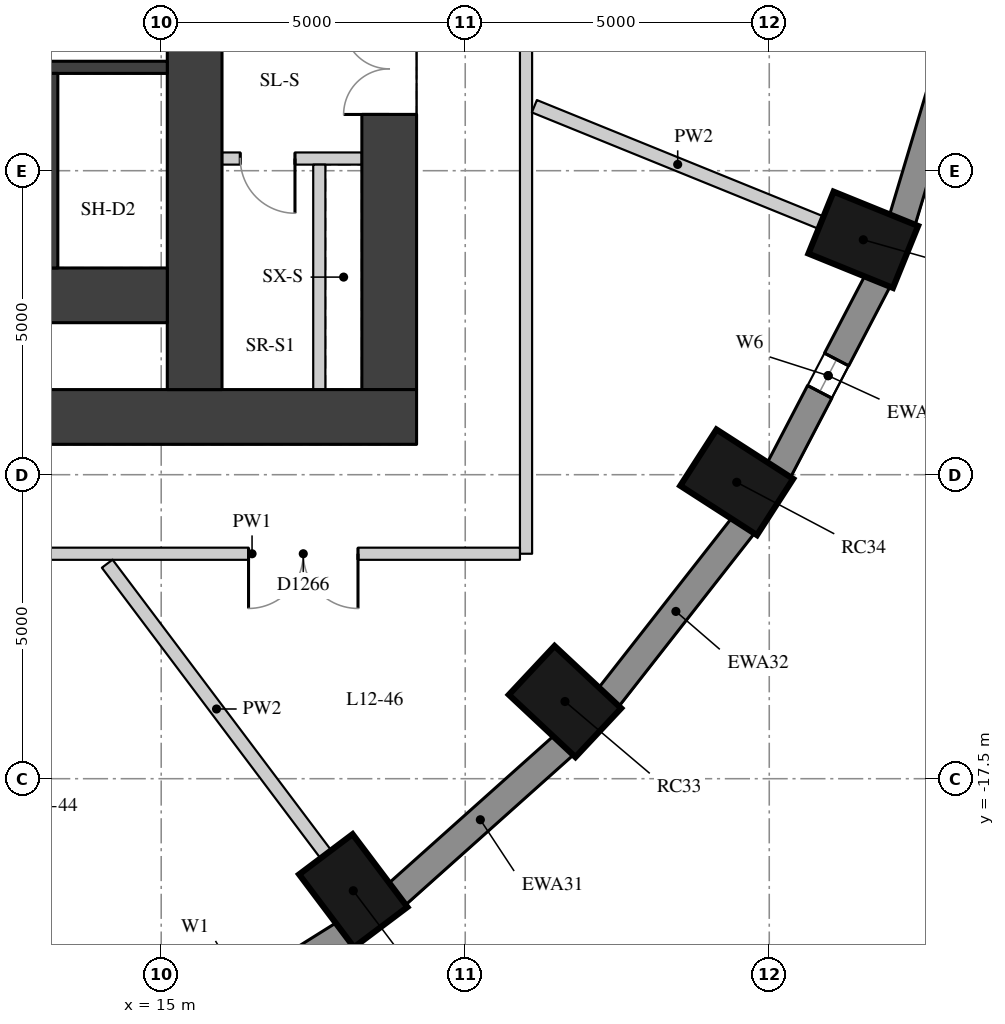
"""IFC4 building model, lengths in metres.
Left out: names, types, materials, properties, quantities, classifications, styles, units other than length and angle.
Written with IfcOpenShell. Run it as: python <this file> out.ifc"""

import sys

from ifc_helpers import new_model, si_unit, direction, frame, frame_2d, origin, origin_2d, place, context, subcontext, project, spatial, rectangle, extrude, element, fill, save


model = new_model("IFC4")
c1 = context("Model", 3, precision=1e-05, world=origin(), true_north=direction((0.0, 1.0)))
c2 = subcontext(c1, "Body", "Model", "MODEL_VIEW")
j1 = project(units=[si_unit("LENGTHUNIT", "METRE"), si_unit("PLANEANGLEUNIT", "RADIAN")], contexts=[c1])
p1 = place(None, origin())
s1 = spatial("IfcSite", under=j1, at=p1, CompositionType="ELEMENT")
p2 = place(p1, origin())
s2 = spatial("IfcBuilding", under=s1, at=p2, CompositionType="ELEMENT")
p3 = place(p2, frame((0.0, 0.0, 48.1)))
s3 = spatial("IfcBuildingStorey", under=s2, at=p3, CompositionType="ELEMENT", Elevation=48.1)
for number, where, z_axis, x_axis in (
    (1, (18.159, -19.343, 0.0), (0.0, 0.0, 1.0), (0.601, -0.799, 0.0)),
    (2, (21.641, -16.23, 0.0), (0.0, 0.0, 1.0), (0.73, -0.683, 0.0)),
    (3, (24.465, -12.625, 0.0), (0.0, 0.0, 1.0), (0.841, -0.541, 0.0)),
    (4, (26.546, -8.636, 0.0), (0.0, 0.0, 1.0), (0.927, -0.376, 0.0)),
):
    element("IfcColumn", number, at=place(p3, frame(where, z_axis=z_axis, x_axis=x_axis)), inside=s3, PredefinedType="COLUMN", context=c2, shape_type="SweptSolid", body=[
        extrude(rectangle(XDim=1.5, YDim=1.1, at=origin_2d()), origin(), (0.0, 0.0, 1.0), 3.3),
    ])
p4 = place(p3, frame((14.817, -22.051, 0.0), z_axis=(0.0, 0.0, 1.0), x_axis=(0.847635480093, 0.530579016629, 0.0)))
e5 = element("IfcWall", 5, at=p4, inside=s3, PredefinedType="SOLIDWALL", context=c2, shape_type="SweptSolid", body=[
    extrude(rectangle(XDim=3.782, YDim=0.45, at=frame_2d((1.891, 0.0))), origin(), (0.0, 0.0, 1.0), 3.02),
])
p5 = place(p4, frame((0.791, 0.0, 0.4)))
e6 = element("IfcOpeningElement", 6, at=p5, cuts=e5, PredefinedType="OPENING", context=c2, shape_type="SweptSolid", body=[
    extrude(rectangle(XDim=2.2, YDim=1.75, at=frame_2d((1.1, 0.875))), frame((0.0, 0.235, 0.0), z_axis=(0.0, -1.0, 0.0), x_axis=(1.0, 0.0, 0.0)), (0.0, 0.0, 1.0), 0.47),
])
p6 = place(p3, frame((18.871, -19.407, 0.0), z_axis=(0.0, 0.0, 1.0), x_axis=(0.745526233716, 0.66647628228, 0.0)))
e7 = element("IfcWall", 7, at=p6, inside=s3, PredefinedType="SOLIDWALL", context=c2, shape_type="SweptSolid", body=[
    extrude(rectangle(XDim=3.697, YDim=0.45, at=frame_2d((1.848, 0.0))), origin(), (0.0, 0.0, 1.0), 3.02),
])
p7 = place(p3, frame((22.352, -16.17, 0.0), z_axis=(0.0, 0.0, 1.0), x_axis=(0.616661975264, 0.787228053529, 0.0)))
e8 = element("IfcWall", 8, at=p7, inside=s3, PredefinedType="SOLIDWALL", context=c2, shape_type="SweptSolid", body=[
    extrude(rectangle(XDim=3.61, YDim=0.45, at=frame_2d((1.805, 0.0))), origin(), (0.0, 0.0, 1.0), 3.02),
])
p8 = place(p3, frame((25.152, -12.437, 0.0), z_axis=(0.0, 0.0, 1.0), x_axis=(0.462492775226, 0.886623050041, 0.0)))
e9 = element("IfcWall", 9, at=p8, inside=s3, PredefinedType="SOLIDWALL", context=c2, shape_type="SweptSolid", body=[
    extrude(rectangle(XDim=3.532, YDim=0.45, at=frame_2d((1.766, 0.0))), origin(), (0.0, 0.0, 1.0), 3.02),
])
p9 = place(p8, frame((1.466, 0.0, 0.4)))
e10 = element("IfcOpeningElement", 10, at=p9, cuts=e9, PredefinedType="OPENING", context=c2, shape_type="SweptSolid", body=[
    extrude(rectangle(XDim=0.6, YDim=1.75, at=frame_2d((0.3, 0.875))), frame((0.0, 0.235, 0.0), z_axis=(0.0, -1.0, 0.0), x_axis=(1.0, 0.0, 0.0)), (0.0, 0.0, 1.0), 0.47),
])
p10 = place(p3, frame((27.185, -8.323, 0.0), z_axis=(0.0, 0.0, 1.0), x_axis=(0.287064133733, 0.957911364963, 0.0)))
e11 = element("IfcWall", 11, at=p10, inside=s3, PredefinedType="SOLIDWALL", context=c2, shape_type="SweptSolid", body=[
    extrude(rectangle(XDim=3.473, YDim=0.45, at=frame_2d((1.737, 0.0))), origin(), (0.0, 0.0, 1.0), 3.02),
])
p11 = place(p3, frame((18.75, -11.1, 0.0), z_axis=(0.0, 0.0, 1.0), x_axis=(0.0, 1.0, 0.0)))
e12 = element("IfcWall", 12, at=p11, inside=s3, PredefinedType="SHEAR", context=c2, shape_type="SweptSolid", body=[
    extrude(rectangle(XDim=22.2, YDim=0.9, at=frame_2d((11.1, 0.0))), origin(), (0.0, 0.0, 1.0), 3.02),
])
p12 = place(p11, frame((15.925, 0.0, 0.0)))
e13 = element("IfcOpeningElement", 13, at=p12, cuts=e12, PredefinedType="OPENING", context=c2, shape_type="SweptSolid", body=[
    extrude(rectangle(XDim=1.5, YDim=2.1, at=frame_2d((0.75, 1.05))), frame((0.0, 0.46, 0.0), z_axis=(0.0, -1.0, 0.0), x_axis=(1.0, 0.0, 0.0)), (0.0, 0.0, 1.0), 0.92),
])
p13 = place(p11, frame((4.525, 0.0, 0.0)))
e14 = element("IfcOpeningElement", 14, at=p13, cuts=e12, PredefinedType="OPENING", context=c2, shape_type="SweptSolid", body=[
    extrude(rectangle(XDim=1.5, YDim=2.1, at=frame_2d((0.75, 1.05))), frame((0.0, 0.46, 0.0), z_axis=(0.0, -1.0, 0.0), x_axis=(1.0, 0.0, 0.0)), (0.0, 0.0, 1.0), 0.92),
])
p14 = place(p3, frame((4.0, -11.55, 0.0), z_axis=(0.0, 0.0, 1.0), x_axis=(1.0, 0.0, 0.0)))
e15 = element("IfcWall", 15, at=p14, inside=s3, PredefinedType="SHEAR", context=c2, shape_type="SweptSolid", body=[
    extrude(rectangle(XDim=15.2, YDim=0.9, at=frame_2d((7.6, 0.0))), origin(), (0.0, 0.0, 1.0), 3.02),
])
p15 = place(p3, frame((15.55, -11.1, 0.0), z_axis=(0.0, 0.0, 1.0), x_axis=(0.0, 1.0, 0.0)))
e16 = element("IfcWall", 16, at=p15, inside=s3, PredefinedType="SHEAR", context=c2, shape_type="SweptSolid", body=[
    extrude(rectangle(XDim=22.2, YDim=0.9, at=frame_2d((11.1, 0.0))), origin(), (0.0, 0.0, 1.0), 3.02),
])
p16 = place(p15, frame((15.6, 0.0, 0.0)))
e17 = element("IfcOpeningElement", 17, at=p16, cuts=e16, PredefinedType="OPENING", context=c2, shape_type="SweptSolid", body=[
    extrude(rectangle(XDim=1.0, YDim=2.1, at=frame_2d((0.5, 1.05))), frame((0.0, 0.46, 0.0), z_axis=(0.0, -1.0, 0.0), x_axis=(1.0, 0.0, 0.0)), (0.0, 0.0, 1.0), 0.92),
])
p17 = place(p15, frame((5.6, 0.0, 0.0)))
e18 = element("IfcOpeningElement", 18, at=p17, cuts=e16, PredefinedType="OPENING", context=c2, shape_type="SweptSolid", body=[
    extrude(rectangle(XDim=1.0, YDim=2.1, at=frame_2d((0.5, 1.05))), frame((0.0, 0.46, 0.0), z_axis=(0.0, -1.0, 0.0), x_axis=(1.0, 0.0, 0.0)), (0.0, 0.0, 1.0), 0.92),
])
p18 = place(p3, frame((4.9, -9.55, 0.0), z_axis=(0.0, 0.0, 1.0), x_axis=(1.0, 0.0, 0.0)))
e19 = element("IfcWall", 19, at=p18, inside=s3, PredefinedType="SHEAR", context=c2, shape_type="SweptSolid", body=[
    extrude(rectangle(XDim=10.2, YDim=0.9, at=frame_2d((5.1, 0.0))), origin(), (0.0, 0.0, 1.0), 3.02),
])
p19 = place(p3, frame((4.9, -5.8, 0.0), z_axis=(0.0, 0.0, 1.0), x_axis=(1.0, 0.0, 0.0)))
e20 = element("IfcWall", 20, at=p19, inside=s3, PredefinedType="SHEAR", context=c2, shape_type="SweptSolid", body=[
    extrude(rectangle(XDim=10.2, YDim=0.2, at=frame_2d((5.1, 0.0))), origin(), (0.0, 0.0, 1.0), 3.02),
])
p20 = place(p3, frame((13.2, -9.1, 0.0), z_axis=(0.0, 0.0, 1.0), x_axis=(0.0, 1.0, 0.0)))
e21 = element("IfcWall", 21, at=p20, inside=s3, PredefinedType="SHEAR", context=c2, shape_type="SweptSolid", body=[
    extrude(rectangle(XDim=3.2, YDim=0.2, at=frame_2d((1.6, 0.0))), origin(), (0.0, 0.0, 1.0), 3.02),
])
p21 = place(p3, frame((16.0, -7.3, 0.0), z_axis=(0.0, 0.0, 1.0), x_axis=(1.0, 0.0, 0.0)))
e22 = element("IfcWall", 22, at=p21, inside=s3, PredefinedType="PARTITIONING", context=c2, shape_type="SweptSolid", body=[
    extrude(rectangle(XDim=2.3, YDim=0.2, at=frame_2d((1.15, 0.0))), origin(), (0.0, 0.0, 1.0), 3.02),
])
p22 = place(p21, frame((0.3, 0.0, 0.0)))
e23 = element("IfcOpeningElement", 23, at=p22, cuts=e22, PredefinedType="OPENING", context=c2, shape_type="SweptSolid", body=[
    extrude(rectangle(XDim=0.9, YDim=2.1, at=frame_2d((0.45, 1.05))), frame((0.0, 0.11, 0.0), z_axis=(0.0, -1.0, 0.0), x_axis=(1.0, 0.0, 0.0)), (0.0, 0.0, 1.0), 0.22),
])
p23 = place(p3, frame((17.6, -11.1, 0.0), z_axis=(0.0, 0.0, 1.0), x_axis=(0.0, 1.0, 0.0)))
e24 = element("IfcWall", 24, at=p23, inside=s3, PredefinedType="PARTITIONING", context=c2, shape_type="SweptSolid", body=[
    extrude(rectangle(XDim=3.7, YDim=0.2, at=frame_2d((1.85, 0.0))), origin(), (0.0, 0.0, 1.0), 3.02),
])
p24 = place(p3, frame((21.0, 13.7, 0.0), z_axis=(0.0, 0.0, 1.0), x_axis=(0.0, -1.0, 0.0)))
e25 = element("IfcWall", 25, at=p24, inside=s3, PredefinedType="PARTITIONING", context=c2, shape_type="SweptSolid", body=[
    extrude(rectangle(XDim=27.5, YDim=0.2, at=frame_2d((13.75, 0.0))), origin(), (0.0, 0.0, 1.0), 3.02),
])
p25 = place(p24, frame((15.992, 0.0, 0.0)))
e26 = element("IfcOpeningElement", 26, at=p25, cuts=e25, PredefinedType="OPENING", context=c2, shape_type="SweptSolid", body=[
    extrude(rectangle(XDim=1.8, YDim=2.1, at=frame_2d((0.9, 1.05))), frame((0.0, 0.11, 0.0), z_axis=(0.0, -1.0, 0.0), x_axis=(1.0, 0.0, 0.0)), (0.0, 0.0, 1.0), 0.22),
])
p26 = place(p24, frame((7.602, 0.0, 0.0)))
e27 = element("IfcOpeningElement", 27, at=p26, cuts=e25, PredefinedType="OPENING", context=c2, shape_type="SweptSolid", body=[
    extrude(rectangle(XDim=1.8, YDim=2.1, at=frame_2d((0.9, 1.05))), frame((0.0, 0.11, 0.0), z_axis=(0.0, -1.0, 0.0), x_axis=(1.0, 0.0, 0.0)), (0.0, 0.0, 1.0), 0.22),
])
p27 = place(p3, frame((20.9, -13.8, 0.0), z_axis=(0.0, 0.0, 1.0), x_axis=(-1.0, 0.0, 0.0)))
e28 = element("IfcWall", 28, at=p27, inside=s3, PredefinedType="PARTITIONING", context=c2, shape_type="SweptSolid", body=[
    extrude(rectangle(XDim=8.812, YDim=0.2, at=frame_2d((4.406, 0.0))), origin(), (0.0, 0.0, 1.0), 3.02),
])
p28 = place(p27, frame((2.664, 0.0, 0.0)))
e29 = element("IfcOpeningElement", 29, at=p28, cuts=e28, PredefinedType="OPENING", context=c2, shape_type="SweptSolid", body=[
    extrude(rectangle(XDim=1.8, YDim=2.1, at=frame_2d((0.9, 1.05))), frame((0.0, 0.11, 0.0), z_axis=(0.0, -1.0, 0.0), x_axis=(1.0, 0.0, 0.0)), (0.0, 0.0, 1.0), 0.22),
])
p29 = place(p3, frame((17.708, -18.743, 0.0), z_axis=(0.0, 0.0, 1.0), x_axis=(-0.601181461694, 0.799112539081, 0.0)))
e30 = element("IfcWall", 30, at=p29, inside=s3, PredefinedType="PARTITIONING", context=c2, shape_type="SweptSolid", body=[
    extrude(rectangle(XDim=5.981, YDim=0.22, at=frame_2d((2.99, 0.0))), origin(), (0.0, 0.0, 1.0), 3.02),
])
p30 = place(p3, frame((25.851, -8.354, 0.0), z_axis=(0.0, 0.0, 1.0), x_axis=(-0.926538195631, 0.376200707118, 0.0)))
e31 = element("IfcWall", 31, at=p30, inside=s3, PredefinedType="PARTITIONING", context=c2, shape_type="SweptSolid", body=[
    extrude(rectangle(XDim=5.088, YDim=0.22, at=frame_2d((2.544, 0.0))), origin(), (0.0, 0.0, 1.0), 3.02),
])
p31 = place(p9, origin())
e32 = element("IfcWindow", 32, at=p31, inside=s3, PartitioningType="SINGLE_PANEL", PredefinedType="WINDOW", context=c2, shape_type="SweptSolid", body=[
    extrude(rectangle(XDim=0.6, YDim=1.75, at=frame_2d((0.3, 0.875))), frame((0.0, 0.035, 0.0), z_axis=(0.0, -1.0, 0.0), x_axis=(1.0, 0.0, 0.0)), (0.0, 0.0, 1.0), 0.06),
])
fill(e10, e32)
p32 = place(p13, origin())
e33 = element("IfcDoor", 33, at=p32, inside=s3, OperationType="DOUBLE_DOOR_SINGLE_SWING", PredefinedType="DOOR", context=c2, shape_type="SweptSolid", body=[
    extrude(rectangle(XDim=1.5, YDim=2.1, at=frame_2d((0.75, 1.05))), frame((0.0, 0.025, 0.0), z_axis=(0.0, -1.0, 0.0), x_axis=(1.0, 0.0, 0.0)), (0.0, 0.0, 1.0), 0.05),
])
fill(e14, e33)
p33 = place(p22, origin())
e34 = element("IfcDoor", 34, at=p33, inside=s3, OperationType="SINGLE_SWING_LEFT", PredefinedType="DOOR", context=c2, shape_type="SweptSolid", body=[
    extrude(rectangle(XDim=0.9, YDim=2.1, at=frame_2d((0.45, 1.05))), frame((0.0, 0.025, 0.0), z_axis=(0.0, -1.0, 0.0), x_axis=(1.0, 0.0, 0.0)), (0.0, 0.0, 1.0), 0.05),
])
fill(e23, e34)
p34 = place(p28, origin())
e35 = element("IfcDoor", 35, at=p34, inside=s3, OperationType="DOUBLE_DOOR_SINGLE_SWING", PredefinedType="DOOR", context=c2, shape_type="SweptSolid", body=[
    extrude(rectangle(XDim=1.8, YDim=2.1, at=frame_2d((0.9, 1.05))), frame((0.0, 0.025, 0.0), z_axis=(0.0, -1.0, 0.0), x_axis=(1.0, 0.0, 0.0)), (0.0, 0.0, 1.0), 0.05),
])
fill(e29, e35)
save(model, sys.argv[1])
